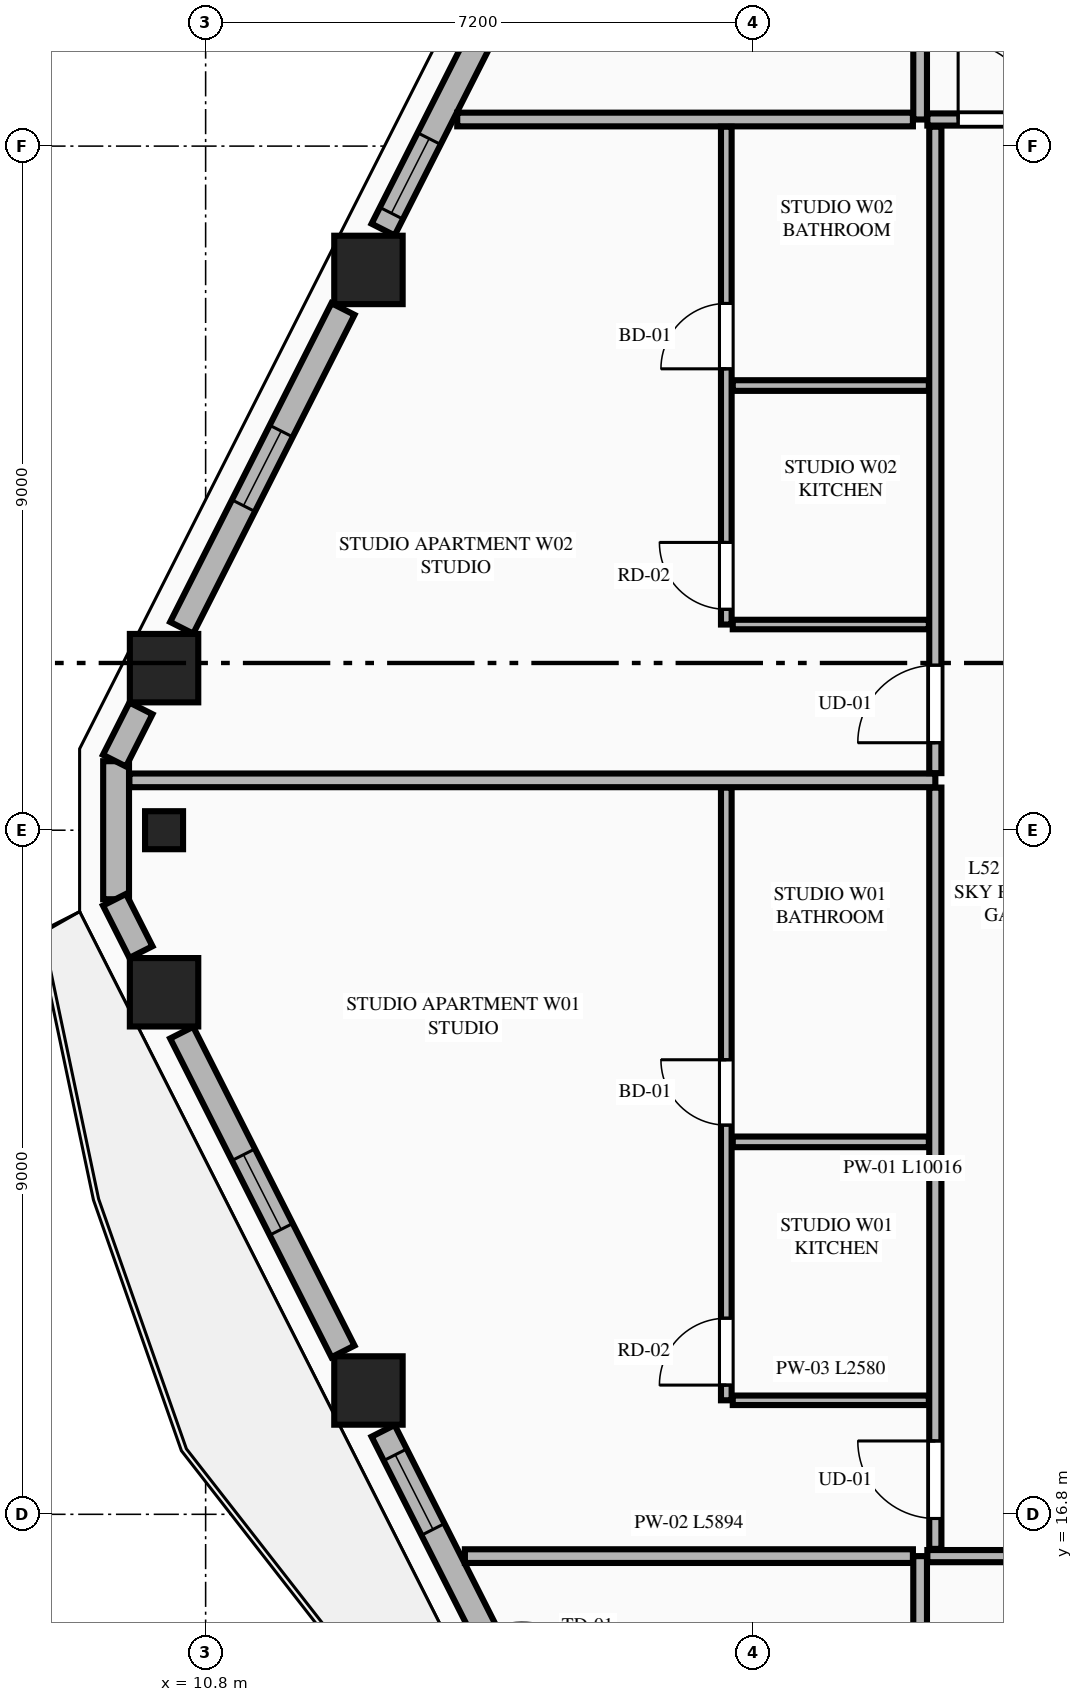
"""IFC4 building model, lengths in metres.
Left out: names, types, materials, properties, quantities, classifications, styles, units other than length and angle.
Written with IfcOpenShell. Run it as: python <this file> out.ifc"""

import sys

from ifc_helpers import new_model, si_unit, direction, frame, frame_2d, origin, origin_2d, place, context, subcontext, project, spatial, rectangle, extrude, element, fill, save


model = new_model("IFC4")
c1 = context("Model", 3, precision=1e-05, world=origin(), true_north=direction((0.0, 1.0)))
c2 = subcontext(c1, "Body", "Model", "MODEL_VIEW")
j1 = project(units=[si_unit("LENGTHUNIT", "METRE"), si_unit("PLANEANGLEUNIT", "RADIAN")], contexts=[c1])
p1 = place(None, origin())
s1 = spatial("IfcSite", under=j1, at=p1, CompositionType="ELEMENT")
p2 = place(p1, origin())
s2 = spatial("IfcBuilding", under=s1, at=p2, CompositionType="ELEMENT")
p3 = place(p2, frame((0.0, 0.0, 196.75)))
s3 = spatial("IfcBuildingStorey", under=s2, at=p3, CompositionType="ELEMENT", Elevation=196.75)
for number, where, z_axis, x_axis in (
    (1, (12.942, 33.171, 0.0), (0.0, 0.0, 1.0), (1.0, 0.0, 0.0)),
    (2, (10.253, 27.932, 0.0), (0.0, 0.0, 1.0), (1.0, 0.0, 0.0)),
    (3, (10.253, 23.668, 0.0), (0.0, 0.0, 1.0), (1.0, 0.0, 0.0)),
    (4, (12.942, 18.429, 0.0), (0.0, 0.0, 1.0), (1.0, 0.0, 0.0)),
):
    element("IfcColumn", number, at=place(p3, frame(where, z_axis=z_axis, x_axis=x_axis)), inside=s3, PredefinedType="COLUMN", context=c2, shape_type="SweptSolid", body=[
        extrude(rectangle(XDim=0.9, YDim=0.9, at=origin_2d()), origin(), (0.0, 0.0, 1.0), 3.55),
    ])
p4 = place(p3, frame((10.253, 25.8, 0.0), z_axis=(0.0, 0.0, 1.0), x_axis=(0.0, -1.0, 0.0)))
e5 = element("IfcColumn", 5, at=p4, inside=s3, PredefinedType="PILASTER", context=c2, shape_type="SweptSolid", body=[
    extrude(rectangle(XDim=0.5, YDim=0.35, at=origin_2d()), origin(), (0.0, 0.0, 1.0), 3.55),
])
p5 = place(p3, frame((9.622, 26.708, 0.0), z_axis=(0.0, 0.0, 1.0), x_axis=(0.0, -1.0, 0.0)))
e6 = element("IfcWall", 6, at=p5, inside=s3, PredefinedType="STANDARD", context=c2, shape_type="SweptSolid", body=[
    extrude(rectangle(XDim=1.816, YDim=0.34, at=frame_2d((0.908, 0.0))), origin(), (0.0, 0.0, 1.0), 3.35),
])
p6 = place(p3, frame((15.352, 38.083, 0.0), z_axis=(0.0, 0.0, 1.0), x_axis=(-0.451524246964, -0.89225884944, 0.0)))
e7 = element("IfcWall", 7, at=p6, inside=s3, PredefinedType="STANDARD", context=c2, shape_type="SweptSolid", body=[
    extrude(rectangle(XDim=4.91, YDim=0.34, at=frame_2d((2.455, 0.0))), origin(), (0.0, 0.0, 1.0), 2.883),
])
p7 = place(p6, frame((0.963, 0.0, 0.75)))
e8 = element("IfcOpeningElement", 8, at=p7, cuts=e7, PredefinedType="OPENING", context=c2, shape_type="SweptSolid", body=[
    extrude(rectangle(XDim=1.1, YDim=1.983, at=frame_2d((0.55, 0.991))), frame((0.0, 0.18, 0.0), z_axis=(0.0, -1.0, 0.0), x_axis=(1.0, 0.0, 0.0)), (0.0, 0.0, 1.0), 0.36),
])
p8 = place(p6, frame((3.569, 0.0, 0.75)))
e9 = element("IfcOpeningElement", 9, at=p8, cuts=e7, PredefinedType="OPENING", context=c2, shape_type="SweptSolid", body=[
    extrude(rectangle(XDim=1.1, YDim=1.983, at=frame_2d((0.55, 0.991))), frame((0.0, 0.18, 0.0), z_axis=(0.0, -1.0, 0.0), x_axis=(1.0, 0.0, 0.0)), (0.0, 0.0, 1.0), 0.36),
])
p9 = place(p3, frame((12.607, 32.657, 0.0), z_axis=(0.0, 0.0, 1.0), x_axis=(-0.451426298588, -0.892308409096, 0.0)))
e10 = element("IfcWall", 10, at=p9, inside=s3, PredefinedType="STANDARD", context=c2, shape_type="SweptSolid", body=[
    extrude(rectangle(XDim=4.7, YDim=0.34, at=frame_2d((2.35, 0.0))), origin(), (0.0, 0.0, 1.0), 2.883),
])
p10 = place(p9, frame((1.8, 0.0, 0.75)))
e11 = element("IfcOpeningElement", 11, at=p10, cuts=e10, PredefinedType="OPENING", context=c2, shape_type="SweptSolid", body=[
    extrude(rectangle(XDim=1.1, YDim=1.983, at=frame_2d((0.55, 0.991))), frame((0.0, 0.18, 0.0), z_axis=(0.0, -1.0, 0.0), x_axis=(1.0, 0.0, 0.0)), (0.0, 0.0, 1.0), 0.36),
])
for number, where, z_axis, x_axis in (
    (12, (9.949, 27.403, 0.0), (0.0, 0.0, 1.0), (-0.451, -0.892, 0.0)),
    (13, (9.601, 24.885, 0.0), (0.0, 0.0, 1.0), (0.451, -0.892, 0.0)),
):
    element("IfcWall", number, at=place(p3, frame(where, z_axis=z_axis, x_axis=x_axis)), inside=s3, PredefinedType="STANDARD", context=c2, shape_type="SweptSolid", body=[
        extrude(rectangle(XDim=0.771, YDim=0.34, at=frame_2d((0.385, 0.0))), origin(), (0.0, 0.0, 1.0), 3.35),
    ])
p11 = place(p3, frame((10.485, 23.137, 0.0), z_axis=(0.0, 0.0, 1.0), x_axis=(0.451447222193, -0.892297823361, 0.0)))
e14 = element("IfcWall", 14, at=p11, inside=s3, PredefinedType="STANDARD", context=c2, shape_type="SweptSolid", body=[
    extrude(rectangle(XDim=4.7, YDim=0.34, at=frame_2d((2.35, 0.0))), origin(), (0.0, 0.0, 1.0), 2.883),
])
p12 = place(p11, frame((1.8, 0.0, 0.75)))
e15 = element("IfcOpeningElement", 15, at=p12, cuts=e14, PredefinedType="OPENING", context=c2, shape_type="SweptSolid", body=[
    extrude(rectangle(XDim=1.1, YDim=1.983, at=frame_2d((0.55, 0.991))), frame((0.0, 0.18, 0.0), z_axis=(0.0, -1.0, 0.0), x_axis=(1.0, 0.0, 0.0)), (0.0, 0.0, 1.0), 0.36),
])
p13 = place(p3, frame((13.135, 17.898, 0.0), z_axis=(0.0, 0.0, 1.0), x_axis=(0.451544279509, -0.892248711763, 0.0)))
e16 = element("IfcWall", 16, at=p13, inside=s3, PredefinedType="STANDARD", context=c2, shape_type="SweptSolid", body=[
    extrude(rectangle(XDim=4.91, YDim=0.34, at=frame_2d((2.455, 0.0))), origin(), (0.0, 0.0, 1.0), 2.883),
])
p14 = place(p13, frame((2.954, 0.0, 0.0)))
e17 = element("IfcOpeningElement", 17, at=p14, cuts=e16, PredefinedType="OPENING", context=c2, shape_type="SweptSolid", body=[
    extrude(rectangle(XDim=1.1, YDim=2.25, at=frame_2d((0.55, 1.125))), frame((0.0, 0.18, 0.0), z_axis=(0.0, -1.0, 0.0), x_axis=(1.0, 0.0, 0.0)), (0.0, 0.0, 1.0), 0.36),
])
p15 = place(p13, frame((0.353, 0.0, 0.75)))
e18 = element("IfcOpeningElement", 18, at=p15, cuts=e16, PredefinedType="OPENING", context=c2, shape_type="SweptSolid", body=[
    extrude(rectangle(XDim=1.1, YDim=1.983, at=frame_2d((0.55, 0.991))), frame((0.0, 0.18, 0.0), z_axis=(0.0, -1.0, 0.0), x_axis=(1.0, 0.0, 0.0)), (0.0, 0.0, 1.0), 0.36),
])
p16 = place(p3, frame((20.2, 5.968, 0.0), z_axis=(0.0, 0.0, 1.0), x_axis=(0.0, 1.0, 0.0)))
e19 = element("IfcWall", 19, at=p16, inside=s3, PredefinedType="PARTITIONING", context=c2, shape_type="SweptSolid", body=[
    extrude(rectangle(XDim=10.282, YDim=0.18, at=frame_2d((5.141, 0.0))), origin(), (0.0, 0.0, 1.0), 3.35),
])
p17 = place(p3, frame((20.295, 16.25, 0.0), z_axis=(0.0, 0.0, 1.0), x_axis=(1.0, 0.0, 0.0)))
e20 = element("IfcWall", 20, at=p17, inside=s3, PredefinedType="PARTITIONING", context=c2, shape_type="SweptSolid", body=[
    extrude(rectangle(XDim=24.21, YDim=0.16, at=frame_2d((12.105, 0.0))), origin(), (0.0, 0.0, 1.0), 3.35),
])
p18 = place(p17, frame((22.005, 0.0, 0.0)))
e21 = element("IfcOpeningElement", 21, at=p18, cuts=e20, PredefinedType="OPENING", context=c2, shape_type="SweptSolid", body=[
    extrude(rectangle(XDim=1.02, YDim=2.25, at=frame_2d((0.51, 1.125))), frame((0.0, 0.09, 0.0), z_axis=(0.0, -1.0, 0.0), x_axis=(1.0, 0.0, 0.0)), (0.0, 0.0, 1.0), 0.18),
])
p19 = place(p3, frame((20.2, 35.15, 0.0), z_axis=(0.0, 0.0, 1.0), x_axis=(0.0, 1.0, 0.0)))
e22 = element("IfcWall", 22, at=p19, inside=s3, PredefinedType="PARTITIONING", context=c2, shape_type="SweptSolid", body=[
    extrude(rectangle(XDim=10.482, YDim=0.18, at=frame_2d((5.241, 0.0))), origin(), (0.0, 0.0, 1.0), 3.35),
])
p20 = place(p3, frame((20.295, 35.15, 0.0), z_axis=(0.0, 0.0, 1.0), x_axis=(1.0, 0.0, 0.0)))
e23 = element("IfcWall", 23, at=p20, inside=s3, PredefinedType="PARTITIONING", context=c2, shape_type="SweptSolid", body=[
    extrude(rectangle(XDim=8.467, YDim=0.16, at=frame_2d((4.233, 0.0))), origin(), (0.0, 0.0, 1.0), 3.35),
])
p21 = place(p20, frame((0.405, 0.0, 0.0)))
e24 = element("IfcOpeningElement", 24, at=p21, cuts=e23, PredefinedType="OPENING", context=c2, shape_type="SweptSolid", body=[
    extrude(rectangle(XDim=1.02, YDim=2.25, at=frame_2d((0.51, 1.125))), frame((0.0, 0.09, 0.0), z_axis=(0.0, -1.0, 0.0), x_axis=(1.0, 0.0, 0.0)), (0.0, 0.0, 1.0), 0.18),
])
p22 = place(p3, frame((14.211, 16.25, 0.0), z_axis=(0.0, 0.0, 1.0), x_axis=(1.0, 0.0, 0.0)))
e25 = element("IfcWall", 25, at=p22, inside=s3, PredefinedType="PARTITIONING", context=c2, shape_type="SweptSolid", body=[
    extrude(rectangle(XDim=5.894, YDim=0.18, at=frame_2d((2.947, 0.0))), origin(), (0.0, 0.0, 1.0), 3.35),
])
p23 = place(p3, frame((14.11, 35.15, 0.0), z_axis=(0.0, 0.0, 1.0), x_axis=(1.0, 0.0, 0.0)))
e26 = element("IfcWall", 26, at=p23, inside=s3, PredefinedType="PARTITIONING", context=c2, shape_type="SweptSolid", body=[
    extrude(rectangle(XDim=5.995, YDim=0.18, at=frame_2d((2.998, 0.0))), origin(), (0.0, 0.0, 1.0), 3.35),
])
p24 = place(p3, frame((20.4, 16.345, 0.0), z_axis=(0.0, 0.0, 1.0), x_axis=(0.0, 1.0, 0.0)))
e27 = element("IfcWall", 27, at=p24, inside=s3, PredefinedType="PARTITIONING", context=c2, shape_type="SweptSolid", body=[
    extrude(rectangle(XDim=10.016, YDim=0.16, at=frame_2d((5.008, 0.0))), origin(), (0.0, 0.0, 1.0), 3.35),
])
p25 = place(p24, frame((0.4, 0.0, 0.0)))
e28 = element("IfcOpeningElement", 28, at=p25, cuts=e27, PredefinedType="OPENING", context=c2, shape_type="SweptSolid", body=[
    extrude(rectangle(XDim=1.02, YDim=2.25, at=frame_2d((0.51, 1.125))), frame((0.0, 0.09, 0.0), z_axis=(0.0, -1.0, 0.0), x_axis=(1.0, 0.0, 0.0)), (0.0, 0.0, 1.0), 0.18),
])
p26 = place(p3, frame((17.735, 18.3, 0.0), z_axis=(0.0, 0.0, 1.0), x_axis=(1.0, 0.0, 0.0)))
e29 = element("IfcWall", 29, at=p26, inside=s3, PredefinedType="PARTITIONING", context=c2, shape_type="SweptSolid", body=[
    extrude(rectangle(XDim=2.58, YDim=0.125, at=frame_2d((1.29, 0.0))), origin(), (0.0, 0.0, 1.0), 2.807),
])
p27 = place(p3, frame((17.65, 18.3, 0.0), z_axis=(0.0, 0.0, 1.0), x_axis=(0.0, 1.0, 0.0)))
e30 = element("IfcWall", 30, at=p27, inside=s3, PredefinedType="PLUMBINGWALL", context=c2, shape_type="SweptSolid", body=[
    extrude(rectangle(XDim=8.061, YDim=0.14, at=frame_2d((4.031, 0.0))), origin(), (0.0, 0.0, 1.0), 3.35),
])
p28 = place(p27, frame((3.62, 0.0, 0.0)))
e31 = element("IfcOpeningElement", 31, at=p28, cuts=e30, PredefinedType="OPENING", context=c2, shape_type="SweptSolid", body=[
    extrude(rectangle(XDim=0.86, YDim=2.1, at=frame_2d((0.43, 1.05))), frame((0.0, 0.08, 0.0), z_axis=(0.0, -1.0, 0.0), x_axis=(1.0, 0.0, 0.0)), (0.0, 0.0, 1.0), 0.16),
])
p29 = place(p27, frame((0.2, 0.0, 0.0)))
e32 = element("IfcOpeningElement", 32, at=p29, cuts=e30, PredefinedType="OPENING", context=c2, shape_type="SweptSolid", body=[
    extrude(rectangle(XDim=0.88, YDim=2.15, at=frame_2d((0.44, 1.075))), frame((0.0, 0.08, 0.0), z_axis=(0.0, -1.0, 0.0), x_axis=(1.0, 0.0, 0.0)), (0.0, 0.0, 1.0), 0.16),
])
p30 = place(p3, frame((17.735, 21.7, 0.0), z_axis=(0.0, 0.0, 1.0), x_axis=(1.0, 0.0, 0.0)))
e33 = element("IfcWall", 33, at=p30, inside=s3, PredefinedType="PLUMBINGWALL", context=c2, shape_type="SweptSolid", body=[
    extrude(rectangle(XDim=2.58, YDim=0.14, at=frame_2d((1.29, 0.0))), origin(), (0.0, 0.0, 1.0), 3.35),
])
p31 = place(p3, frame((9.797, 26.456, 0.0), z_axis=(0.0, 0.0, 1.0), x_axis=(1.0, 0.0, 0.0)))
e34 = element("IfcWall", 34, at=p31, inside=s3, PredefinedType="PARTITIONING", context=c2, shape_type="SweptSolid", body=[
    extrude(rectangle(XDim=10.603, YDim=0.18, at=frame_2d((5.301, 0.0))), origin(), (0.0, 0.0, 1.0), 3.35),
])
p32 = place(p3, frame((20.4, 26.551, 0.0), z_axis=(0.0, 0.0, 1.0), x_axis=(0.0, 1.0, 0.0)))
e35 = element("IfcWall", 35, at=p32, inside=s3, PredefinedType="PARTITIONING", context=c2, shape_type="SweptSolid", body=[
    extrude(rectangle(XDim=8.504, YDim=0.16, at=frame_2d((4.252, 0.0))), origin(), (0.0, 0.0, 1.0), 3.35),
])
p33 = place(p32, frame((0.4, 0.0, 0.0)))
e36 = element("IfcOpeningElement", 36, at=p33, cuts=e35, PredefinedType="OPENING", context=c2, shape_type="SweptSolid", body=[
    extrude(rectangle(XDim=1.02, YDim=2.25, at=frame_2d((0.51, 1.125))), frame((0.0, 0.09, 0.0), z_axis=(0.0, -1.0, 0.0), x_axis=(1.0, 0.0, 0.0)), (0.0, 0.0, 1.0), 0.18),
])
p34 = place(p3, frame((17.735, 28.506, 0.0), z_axis=(0.0, 0.0, 1.0), x_axis=(1.0, 0.0, 0.0)))
e37 = element("IfcWall", 37, at=p34, inside=s3, PredefinedType="PARTITIONING", context=c2, shape_type="SweptSolid", body=[
    extrude(rectangle(XDim=2.58, YDim=0.125, at=frame_2d((1.29, 0.0))), origin(), (0.0, 0.0, 1.0), 3.35),
])
p35 = place(p3, frame((17.65, 28.506, 0.0), z_axis=(0.0, 0.0, 1.0), x_axis=(0.0, 1.0, 0.0)))
e38 = element("IfcWall", 38, at=p35, inside=s3, PredefinedType="PLUMBINGWALL", context=c2, shape_type="SweptSolid", body=[
    extrude(rectangle(XDim=6.549, YDim=0.14, at=frame_2d((3.274, 0.0))), origin(), (0.0, 0.0, 1.0), 3.35),
])
p36 = place(p35, frame((3.364, 0.0, 0.0)))
e39 = element("IfcOpeningElement", 39, at=p36, cuts=e38, PredefinedType="OPENING", context=c2, shape_type="SweptSolid", body=[
    extrude(rectangle(XDim=0.86, YDim=2.1, at=frame_2d((0.43, 1.05))), frame((0.0, 0.08, 0.0), z_axis=(0.0, -1.0, 0.0), x_axis=(1.0, 0.0, 0.0)), (0.0, 0.0, 1.0), 0.16),
])
p37 = place(p35, frame((0.2, 0.0, 0.0)))
e40 = element("IfcOpeningElement", 40, at=p37, cuts=e38, PredefinedType="OPENING", context=c2, shape_type="SweptSolid", body=[
    extrude(rectangle(XDim=0.88, YDim=2.15, at=frame_2d((0.44, 1.075))), frame((0.0, 0.08, 0.0), z_axis=(0.0, -1.0, 0.0), x_axis=(1.0, 0.0, 0.0)), (0.0, 0.0, 1.0), 0.16),
])
p38 = place(p3, frame((17.735, 31.65, 0.0), z_axis=(0.0, 0.0, 1.0), x_axis=(1.0, 0.0, 0.0)))
e41 = element("IfcWall", 41, at=p38, inside=s3, PredefinedType="PLUMBINGWALL", context=c2, shape_type="SweptSolid", body=[
    extrude(rectangle(XDim=2.58, YDim=0.14, at=frame_2d((1.29, 0.0))), origin(), (0.0, 0.0, 1.0), 3.35),
])
p39 = place(p10, origin())
e42 = element("IfcWindow", 42, at=p39, inside=s3, PartitioningType="SINGLE_PANEL", PredefinedType="WINDOW", context=c2, shape_type="SweptSolid", body=[
    extrude(rectangle(XDim=1.1, YDim=1.983, at=frame_2d((0.55, 0.991))), frame((0.0, 0.03, 0.0), z_axis=(0.0, -1.0, 0.0), x_axis=(1.0, 0.0, 0.0)), (0.0, 0.0, 1.0), 0.06),
])
fill(e11, e42)
p40 = place(p12, origin())
e43 = element("IfcWindow", 43, at=p40, inside=s3, PartitioningType="SINGLE_PANEL", PredefinedType="WINDOW", context=c2, shape_type="SweptSolid", body=[
    extrude(rectangle(XDim=1.1, YDim=1.983, at=frame_2d((0.55, 0.991))), frame((0.0, 0.03, 0.0), z_axis=(0.0, -1.0, 0.0), x_axis=(1.0, 0.0, 0.0)), (0.0, 0.0, 1.0), 0.06),
])
fill(e15, e43)
p41 = place(p21, origin())
e44 = element("IfcDoor", 44, at=p41, inside=s3, OperationType="SINGLE_SWING_LEFT", PredefinedType="DOOR", context=c2, shape_type="SweptSolid", body=[
    extrude(rectangle(XDim=1.02, YDim=2.25, at=frame_2d((0.51, 1.125))), frame((0.0, 0.025, 0.0), z_axis=(0.0, -1.0, 0.0), x_axis=(1.0, 0.0, 0.0)), (0.0, 0.0, 1.0), 0.05),
])
fill(e24, e44)
p42 = place(p28, origin())
e45 = element("IfcDoor", 45, at=p42, inside=s3, OperationType="SINGLE_SWING_RIGHT", PredefinedType="DOOR", context=c2, shape_type="SweptSolid", body=[
    extrude(rectangle(XDim=0.86, YDim=2.1, at=frame_2d((0.43, 1.05))), frame((0.0, 0.025, 0.0), z_axis=(0.0, -1.0, 0.0), x_axis=(1.0, 0.0, 0.0)), (0.0, 0.0, 1.0), 0.05),
])
fill(e31, e45)
p43 = place(p25, origin())
e46 = element("IfcDoor", 46, at=p43, inside=s3, OperationType="SINGLE_SWING_RIGHT", PredefinedType="DOOR", context=c2, shape_type="SweptSolid", body=[
    extrude(rectangle(XDim=1.02, YDim=2.25, at=frame_2d((0.51, 1.125))), frame((0.0, 0.025, 0.0), z_axis=(0.0, -1.0, 0.0), x_axis=(1.0, 0.0, 0.0)), (0.0, 0.0, 1.0), 0.05),
])
fill(e28, e46)
p44 = place(p29, origin())
e47 = element("IfcDoor", 47, at=p44, inside=s3, OperationType="SINGLE_SWING_LEFT", PredefinedType="DOOR", context=c2, shape_type="SweptSolid", body=[
    extrude(rectangle(XDim=0.88, YDim=2.15, at=frame_2d((0.44, 1.075))), frame((0.0, 0.025, 0.0), z_axis=(0.0, -1.0, 0.0), x_axis=(1.0, 0.0, 0.0)), (0.0, 0.0, 1.0), 0.05),
])
fill(e32, e47)
p45 = place(p36, origin())
e48 = element("IfcDoor", 48, at=p45, inside=s3, OperationType="SINGLE_SWING_LEFT", PredefinedType="DOOR", context=c2, shape_type="SweptSolid", body=[
    extrude(rectangle(XDim=0.86, YDim=2.1, at=frame_2d((0.43, 1.05))), frame((0.0, 0.025, 0.0), z_axis=(0.0, -1.0, 0.0), x_axis=(1.0, 0.0, 0.0)), (0.0, 0.0, 1.0), 0.05),
])
fill(e39, e48)
p46 = place(p33, origin())
e49 = element("IfcDoor", 49, at=p46, inside=s3, OperationType="SINGLE_SWING_LEFT", PredefinedType="DOOR", context=c2, shape_type="SweptSolid", body=[
    extrude(rectangle(XDim=1.02, YDim=2.25, at=frame_2d((0.51, 1.125))), frame((0.0, 0.025, 0.0), z_axis=(0.0, -1.0, 0.0), x_axis=(1.0, 0.0, 0.0)), (0.0, 0.0, 1.0), 0.05),
])
fill(e36, e49)
p47 = place(p37, origin())
e50 = element("IfcDoor", 50, at=p47, inside=s3, OperationType="SINGLE_SWING_RIGHT", PredefinedType="DOOR", context=c2, shape_type="SweptSolid", body=[
    extrude(rectangle(XDim=0.88, YDim=2.15, at=frame_2d((0.44, 1.075))), frame((0.0, 0.025, 0.0), z_axis=(0.0, -1.0, 0.0), x_axis=(1.0, 0.0, 0.0)), (0.0, 0.0, 1.0), 0.05),
])
fill(e40, e50)
p48 = place(p8, origin())
e51 = element("IfcWindow", 51, at=p48, inside=s3, PartitioningType="SINGLE_PANEL", PredefinedType="WINDOW", context=c2, shape_type="SweptSolid", body=[
    extrude(rectangle(XDim=1.1, YDim=1.983, at=frame_2d((0.55, 0.991))), frame((0.0, 0.03, 0.0), z_axis=(0.0, -1.0, 0.0), x_axis=(1.0, 0.0, 0.0)), (0.0, 0.0, 1.0), 0.06),
])
fill(e9, e51)
p49 = place(p15, origin())
e52 = element("IfcWindow", 52, at=p49, inside=s3, PartitioningType="SINGLE_PANEL", PredefinedType="WINDOW", context=c2, shape_type="SweptSolid", body=[
    extrude(rectangle(XDim=1.1, YDim=1.983, at=frame_2d((0.55, 0.991))), frame((0.0, 0.03, 0.0), z_axis=(0.0, -1.0, 0.0), x_axis=(1.0, 0.0, 0.0)), (0.0, 0.0, 1.0), 0.06),
])
fill(e18, e52)
save(model, sys.argv[1])
